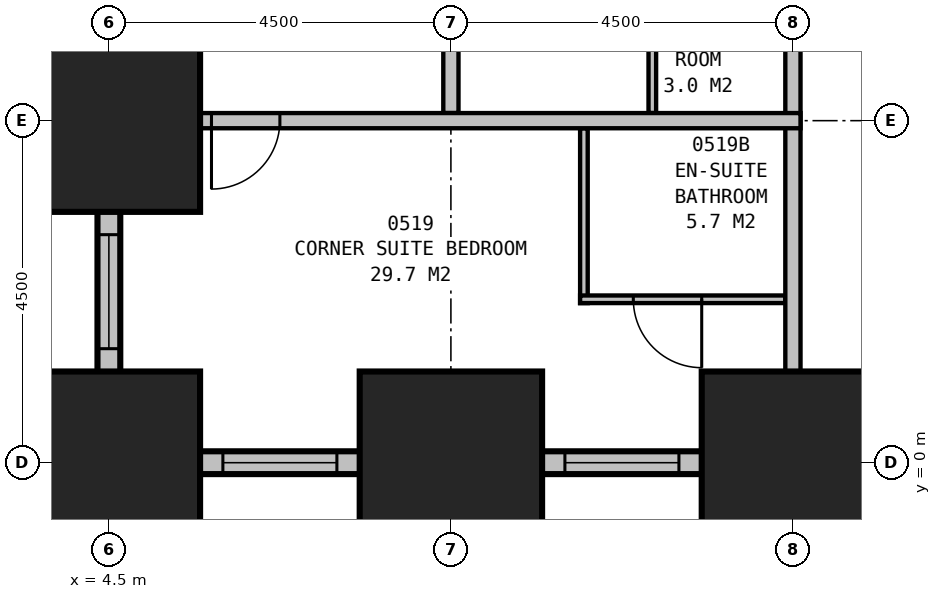
"""IFC4 building model, lengths in metres.
Left out: names, types, materials, properties, quantities, classifications, styles, units other than length and angle.
Written with IfcOpenShell. Run it as: python <this file> out.ifc"""

import sys

from ifc_helpers import new_model, si_unit, direction, frame, frame_2d, origin, origin_2d, place, context, subcontext, project, spatial, rectangle, extrude, element, fill, save


model = new_model("IFC4")
c1 = context("Model", 3, precision=1e-05, world=origin(), true_north=direction((0.0, 1.0)))
c2 = subcontext(c1, "Body", "Model", "MODEL_VIEW")
j1 = project(units=[si_unit("LENGTHUNIT", "METRE"), si_unit("PLANEANGLEUNIT", "RADIAN")], contexts=[c1])
p1 = place(None, origin())
s1 = spatial("IfcSite", under=j1, at=p1, CompositionType="ELEMENT")
p2 = place(p1, origin())
s2 = spatial("IfcBuilding", under=s1, at=p2, CompositionType="ELEMENT")
p3 = place(p2, frame((0.0, 0.0, 29.7)))
s3 = spatial("IfcBuildingStorey", under=s2, at=p3, CompositionType="ELEMENT", Elevation=29.7)
for number, where, z_axis, x_axis in (
    (1, (4.5, 4.5, 0.0), (0.0, 0.0, 1.0), (1.0, 0.0, 0.0)),
    (2, (4.5, 0.0, 0.0), (0.0, 0.0, 1.0), (1.0, 0.0, 0.0)),
    (3, (9.0, 0.0, 0.0), (0.0, 0.0, 1.0), (1.0, 0.0, 0.0)),
    (4, (13.5, 0.0, 0.0), (0.0, 0.0, 1.0), (1.0, 0.0, 0.0)),
):
    element("IfcColumn", number, at=place(p3, frame(where, z_axis=z_axis, x_axis=x_axis)), inside=s3, PredefinedType="COLUMN", context=c2, shape_type="SweptSolid", body=[
        extrude(rectangle(XDim=2.4, YDim=2.4, at=origin_2d()), origin(), (0.0, 0.0, 1.0), 3.5),
    ])
p4 = place(p3, frame((0.35, 4.5, 0.0), z_axis=(0.0, 0.0, 1.0), x_axis=(1.0, 0.0, 0.0)))
e5 = element("IfcWall", 5, at=p4, inside=s3, PredefinedType="STANDARD", context=c2, shape_type="SweptSolid", body=[
    extrude(rectangle(XDim=4.3, YDim=0.3, at=frame_2d((2.15, 0.0))), origin(), (0.0, 0.0, 1.0), 2.05),
])
p5 = place(p4, frame((1.55, 0.0, 0.5)))
e6 = element("IfcOpeningElement", 6, at=p5, cuts=e5, PredefinedType="OPENING", context=c2, shape_type="SweptSolid", body=[
    extrude(rectangle(XDim=1.2, YDim=1.4, at=frame_2d((0.6, 0.7))), frame((0.0, 0.16, 0.0), z_axis=(0.0, -1.0, 0.0), x_axis=(1.0, 0.0, 0.0)), (0.0, 0.0, 1.0), 0.32),
])
p6 = place(p3, frame((4.5, 4.65, 0.0), z_axis=(0.0, 0.0, 1.0), x_axis=(0.0, -1.0, 0.0)))
e7 = element("IfcWall", 7, at=p6, inside=s3, PredefinedType="STANDARD", context=c2, shape_type="SweptSolid", body=[
    extrude(rectangle(XDim=4.8, YDim=0.3, at=frame_2d((2.4, 0.0))), origin(), (0.0, 0.0, 1.0), 2.05),
])
p7 = place(p6, frame((1.65, 0.0, 0.5)))
e8 = element("IfcOpeningElement", 8, at=p7, cuts=e7, PredefinedType="OPENING", context=c2, shape_type="SweptSolid", body=[
    extrude(rectangle(XDim=1.5, YDim=1.4, at=frame_2d((0.75, 0.7))), frame((0.0, 0.16, 0.0), z_axis=(0.0, -1.0, 0.0), x_axis=(1.0, 0.0, 0.0)), (0.0, 0.0, 1.0), 0.32),
])
p8 = place(p3, frame((4.35, 0.0, 0.0), z_axis=(0.0, 0.0, 1.0), x_axis=(1.0, 0.0, 0.0)))
e9 = element("IfcWall", 9, at=p8, inside=s3, PredefinedType="STANDARD", context=c2, shape_type="SweptSolid", body=[
    extrude(rectangle(XDim=40.8, YDim=0.3, at=frame_2d((20.4, 0.0))), origin(), (0.0, 0.0, 1.0), 2.05),
])
p9 = place(p8, frame((1.65, 0.0, 0.5)))
e10 = element("IfcOpeningElement", 10, at=p9, cuts=e9, PredefinedType="OPENING", context=c2, shape_type="SweptSolid", body=[
    extrude(rectangle(XDim=1.5, YDim=1.4, at=frame_2d((0.75, 0.7))), frame((0.0, 0.16, 0.0), z_axis=(0.0, -1.0, 0.0), x_axis=(1.0, 0.0, 0.0)), (0.0, 0.0, 1.0), 0.32),
])
p10 = place(p8, frame((6.15, 0.0, 0.5)))
e11 = element("IfcOpeningElement", 11, at=p10, cuts=e9, PredefinedType="OPENING", context=c2, shape_type="SweptSolid", body=[
    extrude(rectangle(XDim=1.5, YDim=1.4, at=frame_2d((0.75, 0.7))), frame((0.0, 0.16, 0.0), z_axis=(0.0, -1.0, 0.0), x_axis=(1.0, 0.0, 0.0)), (0.0, 0.0, 1.0), 0.32),
])
p11 = place(p8, frame((10.65, 0.0, 0.5)))
e12 = element("IfcOpeningElement", 12, at=p11, cuts=e9, PredefinedType="OPENING", context=c2, shape_type="SweptSolid", body=[
    extrude(rectangle(XDim=1.5, YDim=1.4, at=frame_2d((0.75, 0.7))), frame((0.0, 0.16, 0.0), z_axis=(0.0, -1.0, 0.0), x_axis=(1.0, 0.0, 0.0)), (0.0, 0.0, 1.0), 0.32),
])
p12 = place(p8, frame((15.15, 0.0, 0.5)))
e13 = element("IfcOpeningElement", 13, at=p12, cuts=e9, PredefinedType="OPENING", context=c2, shape_type="SweptSolid", body=[
    extrude(rectangle(XDim=1.5, YDim=1.4, at=frame_2d((0.75, 0.7))), frame((0.0, 0.16, 0.0), z_axis=(0.0, -1.0, 0.0), x_axis=(1.0, 0.0, 0.0)), (0.0, 0.0, 1.0), 0.32),
])
p13 = place(p8, frame((19.65, 0.0, 0.5)))
e14 = element("IfcOpeningElement", 14, at=p13, cuts=e9, PredefinedType="OPENING", context=c2, shape_type="SweptSolid", body=[
    extrude(rectangle(XDim=1.5, YDim=1.4, at=frame_2d((0.75, 0.7))), frame((0.0, 0.16, 0.0), z_axis=(0.0, -1.0, 0.0), x_axis=(1.0, 0.0, 0.0)), (0.0, 0.0, 1.0), 0.32),
])
p14 = place(p8, frame((24.15, 0.0, 0.5)))
e15 = element("IfcOpeningElement", 15, at=p14, cuts=e9, PredefinedType="OPENING", context=c2, shape_type="SweptSolid", body=[
    extrude(rectangle(XDim=1.5, YDim=1.4, at=frame_2d((0.75, 0.7))), frame((0.0, 0.16, 0.0), z_axis=(0.0, -1.0, 0.0), x_axis=(1.0, 0.0, 0.0)), (0.0, 0.0, 1.0), 0.32),
])
p15 = place(p8, frame((28.65, 0.0, 0.5)))
e16 = element("IfcOpeningElement", 16, at=p15, cuts=e9, PredefinedType="OPENING", context=c2, shape_type="SweptSolid", body=[
    extrude(rectangle(XDim=1.5, YDim=1.4, at=frame_2d((0.75, 0.7))), frame((0.0, 0.16, 0.0), z_axis=(0.0, -1.0, 0.0), x_axis=(1.0, 0.0, 0.0)), (0.0, 0.0, 1.0), 0.32),
])
p16 = place(p8, frame((33.15, 0.0, 0.5)))
e17 = element("IfcOpeningElement", 17, at=p16, cuts=e9, PredefinedType="OPENING", context=c2, shape_type="SweptSolid", body=[
    extrude(rectangle(XDim=1.5, YDim=1.4, at=frame_2d((0.75, 0.7))), frame((0.0, 0.16, 0.0), z_axis=(0.0, -1.0, 0.0), x_axis=(1.0, 0.0, 0.0)), (0.0, 0.0, 1.0), 0.32),
])
p17 = place(p8, frame((37.65, 0.0, 0.5)))
e18 = element("IfcOpeningElement", 18, at=p17, cuts=e9, PredefinedType="OPENING", context=c2, shape_type="SweptSolid", body=[
    extrude(rectangle(XDim=1.5, YDim=1.4, at=frame_2d((0.75, 0.7))), frame((0.0, 0.16, 0.0), z_axis=(0.0, -1.0, 0.0), x_axis=(1.0, 0.0, 0.0)), (0.0, 0.0, 1.0), 0.32),
])
p18 = place(p3, frame((4.017, 36.149, 0.0), z_axis=(0.0, 0.0, 1.0), x_axis=(-0.110433201132, -0.993883548555, 0.0)))
e19 = element("IfcWall", 19, at=p18, inside=s3, PredefinedType="STANDARD", context=c2, shape_type="SweptSolid", body=[
    extrude(rectangle(XDim=31.994, YDim=0.3, at=frame_2d((15.997, 0.0))), origin(), (0.0, 0.0, 1.0), 2.05),
])
p19 = place(p18, frame((1.664, 0.0, 0.5)))
e20 = element("IfcOpeningElement", 20, at=p19, cuts=e19, PredefinedType="OPENING", context=c2, shape_type="SweptSolid", body=[
    extrude(rectangle(XDim=1.5, YDim=1.4, at=frame_2d((0.75, 0.7))), frame((0.0, 0.16, 0.0), z_axis=(0.0, -1.0, 0.0), x_axis=(1.0, 0.0, 0.0)), (0.0, 0.0, 1.0), 0.32),
])
p20 = place(p18, frame((6.192, 0.0, 0.5)))
e21 = element("IfcOpeningElement", 21, at=p20, cuts=e19, PredefinedType="OPENING", context=c2, shape_type="SweptSolid", body=[
    extrude(rectangle(XDim=1.5, YDim=1.4, at=frame_2d((0.75, 0.7))), frame((0.0, 0.16, 0.0), z_axis=(0.0, -1.0, 0.0), x_axis=(1.0, 0.0, 0.0)), (0.0, 0.0, 1.0), 0.32),
])
p21 = place(p18, frame((10.719, 0.0, 0.5)))
e22 = element("IfcOpeningElement", 22, at=p21, cuts=e19, PredefinedType="OPENING", context=c2, shape_type="SweptSolid", body=[
    extrude(rectangle(XDim=1.5, YDim=1.4, at=frame_2d((0.75, 0.7))), frame((0.0, 0.16, 0.0), z_axis=(0.0, -1.0, 0.0), x_axis=(1.0, 0.0, 0.0)), (0.0, 0.0, 1.0), 0.32),
])
p22 = place(p18, frame((15.247, 0.0, 0.5)))
e23 = element("IfcOpeningElement", 23, at=p22, cuts=e19, PredefinedType="OPENING", context=c2, shape_type="SweptSolid", body=[
    extrude(rectangle(XDim=1.5, YDim=1.4, at=frame_2d((0.75, 0.7))), frame((0.0, 0.16, 0.0), z_axis=(0.0, -1.0, 0.0), x_axis=(1.0, 0.0, 0.0)), (0.0, 0.0, 1.0), 0.32),
])
p23 = place(p18, frame((19.775, 0.0, 0.5)))
e24 = element("IfcOpeningElement", 24, at=p23, cuts=e19, PredefinedType="OPENING", context=c2, shape_type="SweptSolid", body=[
    extrude(rectangle(XDim=1.5, YDim=1.4, at=frame_2d((0.75, 0.7))), frame((0.0, 0.16, 0.0), z_axis=(0.0, -1.0, 0.0), x_axis=(1.0, 0.0, 0.0)), (0.0, 0.0, 1.0), 0.32),
])
p24 = place(p18, frame((24.302, 0.0, 0.5)))
e25 = element("IfcOpeningElement", 25, at=p24, cuts=e19, PredefinedType="OPENING", context=c2, shape_type="SweptSolid", body=[
    extrude(rectangle(XDim=1.5, YDim=1.4, at=frame_2d((0.75, 0.7))), frame((0.0, 0.16, 0.0), z_axis=(0.0, -1.0, 0.0), x_axis=(1.0, 0.0, 0.0)), (0.0, 0.0, 1.0), 0.32),
])
p25 = place(p18, frame((28.83, 0.0, 0.5)))
e26 = element("IfcOpeningElement", 26, at=p25, cuts=e19, PredefinedType="OPENING", context=c2, shape_type="SweptSolid", body=[
    extrude(rectangle(XDim=1.5, YDim=1.4, at=frame_2d((0.75, 0.7))), frame((0.0, 0.16, 0.0), z_axis=(0.0, -1.0, 0.0), x_axis=(1.0, 0.0, 0.0)), (0.0, 0.0, 1.0), 0.32),
])
p26 = place(p3, frame((13.5, 11.2, 0.0), z_axis=(0.0, 0.0, 1.0), x_axis=(0.0, -1.0, 0.0)))
e27 = element("IfcWall", 27, at=p26, inside=s3, PredefinedType="PARTITIONING", context=c2, shape_type="SweptSolid", body=[
    extrude(rectangle(XDim=11.2, YDim=0.2, at=frame_2d((5.6, 0.0))), origin(), (0.0, 0.0, 1.0), 2.25),
])
p27 = place(p3, frame((13.6, 4.5, 0.0), z_axis=(0.0, 0.0, 1.0), x_axis=(-1.0, 0.0, 0.0)))
e28 = element("IfcWall", 28, at=p27, inside=s3, PredefinedType="PARTITIONING", context=c2, shape_type="SweptSolid", body=[
    extrude(rectangle(XDim=9.1, YDim=0.2, at=frame_2d((4.55, 0.0))), origin(), (0.0, 0.0, 1.0), 3.25),
])
p28 = place(p27, frame((6.85, 0.0, 0.0)))
e29 = element("IfcOpeningElement", 29, at=p28, cuts=e28, PredefinedType="OPENING", context=c2, shape_type="SweptSolid", body=[
    extrude(rectangle(XDim=0.9, YDim=2.1, at=frame_2d((0.45, 1.05))), frame((0.0, 0.11, 0.0), z_axis=(0.0, -1.0, 0.0), x_axis=(1.0, 0.0, 0.0)), (0.0, 0.0, 1.0), 0.22),
])
p29 = place(p3, frame((9.0, 4.6, 0.0), z_axis=(0.0, 0.0, 1.0), x_axis=(0.0, 1.0, 0.0)))
e30 = element("IfcWall", 30, at=p29, inside=s3, PredefinedType="PARTITIONING", context=c2, shape_type="SweptSolid", body=[
    extrude(rectangle(XDim=8.8, YDim=0.2, at=frame_2d((4.4, 0.0))), origin(), (0.0, 0.0, 1.0), 2.25),
])
p30 = place(p29, frame((4.05, 0.0, 0.0)))
e31 = element("IfcOpeningElement", 31, at=p30, cuts=e30, PredefinedType="OPENING", context=c2, shape_type="SweptSolid", body=[
    extrude(rectangle(XDim=0.9, YDim=2.1, at=frame_2d((0.45, 1.05))), frame((0.0, 0.11, 0.0), z_axis=(0.0, -1.0, 0.0), x_axis=(1.0, 0.0, 0.0)), (0.0, 0.0, 1.0), 0.22),
])
p31 = place(p3, frame((11.65, 4.6, 0.0), z_axis=(0.0, 0.0, 1.0), x_axis=(0.0, 1.0, 0.0)))
e32 = element("IfcWall", 32, at=p31, inside=s3, PredefinedType="PLUMBINGWALL", context=c2, shape_type="SweptSolid", body=[
    extrude(rectangle(XDim=2.0, YDim=0.1, at=frame_2d((1.0, 0.0))), origin(), (0.0, 0.0, 1.0), 3.25),
])
p32 = place(p3, frame((10.75, 4.4, 0.0), z_axis=(0.0, 0.0, 1.0), x_axis=(0.0, -1.0, 0.0)))
e33 = element("IfcWall", 33, at=p32, inside=s3, PredefinedType="PLUMBINGWALL", context=c2, shape_type="SweptSolid", body=[
    extrude(rectangle(XDim=2.3, YDim=0.1, at=frame_2d((1.15, 0.0))), origin(), (0.0, 0.0, 1.0), 3.25),
])
p33 = place(p3, frame((13.4, 2.15, 0.0), z_axis=(0.0, 0.0, 1.0), x_axis=(-1.0, 0.0, 0.0)))
e34 = element("IfcWall", 34, at=p33, inside=s3, PredefinedType="PLUMBINGWALL", context=c2, shape_type="SweptSolid", body=[
    extrude(rectangle(XDim=2.7, YDim=0.1, at=frame_2d((1.35, 0.0))), origin(), (0.0, 0.0, 1.0), 3.25),
])
p34 = place(p33, frame((1.1, 0.0, 0.0)))
e35 = element("IfcOpeningElement", 35, at=p34, cuts=e34, PredefinedType="OPENING", context=c2, shape_type="SweptSolid", body=[
    extrude(rectangle(XDim=0.9, YDim=2.1, at=frame_2d((0.45, 1.05))), frame((0.0, 0.06, 0.0), z_axis=(0.0, -1.0, 0.0), x_axis=(1.0, 0.0, 0.0)), (0.0, 0.0, 1.0), 0.12),
])
p35 = place(p7, origin())
e36 = element("IfcWindow", 36, at=p35, inside=s3, PartitioningType="SINGLE_PANEL", PredefinedType="WINDOW", context=c2, shape_type="SweptSolid", body=[
    extrude(rectangle(XDim=1.5, YDim=1.4, at=frame_2d((0.75, 0.7))), frame((0.0, 0.03, 0.0), z_axis=(0.0, -1.0, 0.0), x_axis=(1.0, 0.0, 0.0)), (0.0, 0.0, 1.0), 0.06),
])
fill(e8, e36)
p36 = place(p9, origin())
e37 = element("IfcWindow", 37, at=p36, inside=s3, PartitioningType="SINGLE_PANEL", PredefinedType="WINDOW", context=c2, shape_type="SweptSolid", body=[
    extrude(rectangle(XDim=1.5, YDim=1.4, at=frame_2d((0.75, 0.7))), frame((0.0, 0.03, 0.0), z_axis=(0.0, -1.0, 0.0), x_axis=(1.0, 0.0, 0.0)), (0.0, 0.0, 1.0), 0.06),
])
fill(e10, e37)
p37 = place(p10, origin())
e38 = element("IfcWindow", 38, at=p37, inside=s3, PartitioningType="SINGLE_PANEL", PredefinedType="WINDOW", context=c2, shape_type="SweptSolid", body=[
    extrude(rectangle(XDim=1.5, YDim=1.4, at=frame_2d((0.75, 0.7))), frame((0.0, 0.03, 0.0), z_axis=(0.0, -1.0, 0.0), x_axis=(1.0, 0.0, 0.0)), (0.0, 0.0, 1.0), 0.06),
])
fill(e11, e38)
p38 = place(p28, origin())
e39 = element("IfcDoor", 39, at=p38, inside=s3, OperationType="SINGLE_SWING_RIGHT", PredefinedType="DOOR", context=c2, shape_type="SweptSolid", body=[
    extrude(rectangle(XDim=0.9, YDim=2.1, at=frame_2d((0.45, 1.05))), frame((0.0, 0.025, 0.0), z_axis=(0.0, -1.0, 0.0), x_axis=(1.0, 0.0, 0.0)), (0.0, 0.0, 1.0), 0.05),
])
fill(e29, e39)
p39 = place(p34, origin())
e40 = element("IfcDoor", 40, at=p39, inside=s3, OperationType="SINGLE_SWING_LEFT", PredefinedType="DOOR", context=c2, shape_type="SweptSolid", body=[
    extrude(rectangle(XDim=0.9, YDim=2.1, at=frame_2d((0.45, 1.05))), frame((0.0, 0.025, 0.0), z_axis=(0.0, -1.0, 0.0), x_axis=(1.0, 0.0, 0.0)), (0.0, 0.0, 1.0), 0.05),
])
fill(e35, e40)
save(model, sys.argv[1])
